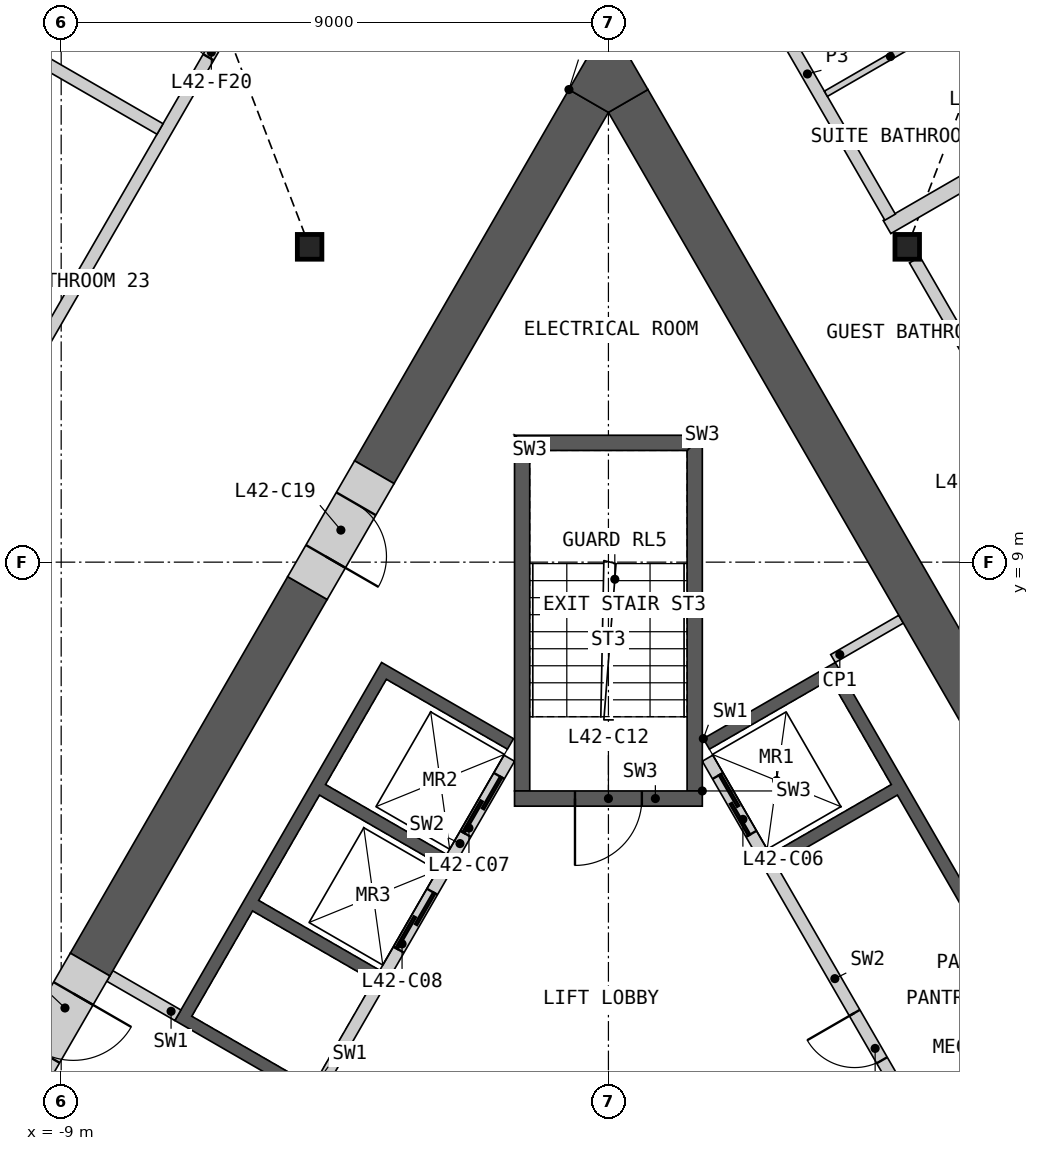
"""IFC4 building model, lengths in metres.
Left out: names, types, materials, properties, quantities, classifications, styles, units other than length and angle.
Written with IfcOpenShell. Run it as: python <this file> out.ifc"""

import sys

from ifc_helpers import new_model, si_unit, direction, frame, frame_2d, origin, origin_2d, place, context, subcontext, project, spatial, polyline, rectangle, i_section, outline, extrude, element, fill, save


model = new_model("IFC4")
c1 = context("Model", 3, precision=1e-05, world=origin(), true_north=direction((0.0, 1.0)))
c2 = subcontext(c1, "Body", "Model", "MODEL_VIEW")
j1 = project(units=[si_unit("LENGTHUNIT", "METRE"), si_unit("PLANEANGLEUNIT", "RADIAN")], contexts=[c1])
p1 = place(None, origin())
s1 = spatial("IfcSite", under=j1, at=p1, CompositionType="ELEMENT")
p2 = place(p1, origin())
s2 = spatial("IfcBuilding", under=s1, at=p2, CompositionType="ELEMENT")
p3 = place(p2, frame((0.0, 0.0, 194.4)))
s3 = spatial("IfcBuildingStorey", under=s2, at=p3, CompositionType="ELEMENT", Elevation=194.4)
for number, where, z_axis, x_axis in (
    (1, (-4.914, 14.186, 0.0), (0.0, 0.0, 1.0), (1.0, 0.0, 0.0)),
    (2, (4.914, 14.186, 0.0), (0.0, 0.0, 1.0), (1.0, 0.0, 0.0)),
):
    element("IfcColumn", number, at=place(p3, frame(where, z_axis=z_axis, x_axis=x_axis)), inside=s3, PredefinedType="COLUMN", context=c2, shape_type="SweptSolid", body=[
        extrude(i_section(OverallWidth=0.404, OverallDepth=0.407, WebThickness=0.027, FlangeThickness=0.044, at=origin_2d()), origin(), (0.0, 0.0, 1.0), 3.6),
    ])
p4 = place(p3, origin())
e3 = element("IfcWall", 3, at=p4, inside=s3, PredefinedType="SHEAR", context=c2, shape_type="SweptSolid", body=[
    extrude(outline(polyline([(1.561, 6.097), (3.731, 7.35), (8.231, -0.444), (6.061, -1.697), (5.96, -1.524), (7.952, -0.374), (4.752, 5.169), (2.76, 4.019), (2.66, 4.192), (4.652, 5.342), (3.652, 7.074), (1.66, 5.924), (1.561, 6.097)])), origin(), (0.0, 0.0, 1.0), 3.25),
])
p5 = place(p3, frame((5.817, -1.476, 0.0), z_axis=(0.0, 0.0, 1.0), x_axis=(-0.500002616675, 0.866023893041, 0.0)))
e4 = element("IfcWall", 4, at=p5, inside=s3, PredefinedType="SOLIDWALL", context=c2, shape_type="SweptSolid", body=[
    extrude(rectangle(XDim=8.373, YDim=0.2, at=frame_2d((4.187, 0.0))), origin(), (0.0, 0.0, 1.0), 3.25),
])
p6 = place(p5, frame((2.637, 0.0, 0.0)))
e5 = element("IfcOpeningElement", 5, at=p6, cuts=e4, PredefinedType="OPENING", context=c2, shape_type="SweptSolid", body=[
    extrude(rectangle(XDim=0.9, YDim=2.1, at=frame_2d((0.45, 1.05))), frame((0.0, 0.11, 0.0), z_axis=(0.0, -1.0, 0.0), x_axis=(1.0, 0.0, 0.0)), (0.0, 0.0, 1.0), 0.22),
])
p7 = place(p5, frame((6.937, 0.0, 0.0)))
e6 = element("IfcOpeningElement", 6, at=p7, cuts=e4, PredefinedType="OPENING", context=c2, shape_type="SweptSolid", body=[
    extrude(rectangle(XDim=1.1, YDim=2.1, at=frame_2d((0.55, 1.05))), frame((0.0, 0.11, 0.0), z_axis=(0.0, -1.0, 0.0), x_axis=(1.0, 0.0, 0.0)), (0.0, 0.0, 1.0), 0.22),
])
p8 = place(p3, origin())
e7 = element("IfcWall", 7, at=p8, inside=s3, PredefinedType="SHEAR", context=c2, shape_type="SweptSolid", body=[
    extrude(outline(polyline([(-4.96, 0.208), (-7.131, 1.461), (-3.731, 7.35), (-1.561, 6.097), (-1.66, 5.924), (-3.652, 7.074), (-4.652, 5.342), (-2.66, 4.192), (-2.76, 4.019), (-4.752, 5.169), (-5.752, 3.437), (-3.76, 2.287), (-3.861, 2.113), (-5.852, 3.263), (-6.852, 1.531), (-4.861, 0.381), (-4.96, 0.208)])), origin(), (0.0, 0.0, 1.0), 3.25),
])
p9 = place(p3, frame((-1.631, 5.776, 0.0), z_axis=(0.0, 0.0, 1.0), x_axis=(-0.499992876559, -0.866029516466, 0.0)))
e8 = element("IfcWall", 8, at=p9, inside=s3, PredefinedType="SOLIDWALL", context=c2, shape_type="SweptSolid", body=[
    extrude(rectangle(XDim=6.486, YDim=0.2, at=frame_2d((3.243, 0.0))), origin(), (0.0, 0.0, 1.0), 3.25),
])
p10 = place(p9, frame((0.337, 0.0, 0.0)))
e9 = element("IfcOpeningElement", 9, at=p10, cuts=e8, PredefinedType="OPENING", context=c2, shape_type="SweptSolid", body=[
    extrude(rectangle(XDim=1.1, YDim=2.1, at=frame_2d((0.55, 1.05))), frame((0.0, 0.11, 0.0), z_axis=(0.0, -1.0, 0.0), x_axis=(1.0, 0.0, 0.0)), (0.0, 0.0, 1.0), 0.22),
])
p11 = place(p9, frame((2.537, 0.0, 0.0)))
e10 = element("IfcOpeningElement", 10, at=p11, cuts=e8, PredefinedType="OPENING", context=c2, shape_type="SweptSolid", body=[
    extrude(rectangle(XDim=1.1, YDim=2.1, at=frame_2d((0.55, 1.05))), frame((0.0, 0.11, 0.0), z_axis=(0.0, -1.0, 0.0), x_axis=(1.0, 0.0, 0.0)), (0.0, 0.0, 1.0), 0.22),
])
p12 = place(p3, frame((-7.081, 1.548, 0.0), z_axis=(0.0, 0.0, 1.0), x_axis=(-0.866003189247, 0.500038474733, 0.0)))
e11 = element("IfcWall", 11, at=p12, inside=s3, PredefinedType="SHEAR", context=c2, shape_type="SweptSolid", body=[
    extrude(rectangle(XDim=1.293, YDim=0.2, at=frame_2d((0.646, 0.0))), origin(), (0.0, 0.0, 1.0), 3.25),
])
p13 = place(p3, origin())
e12 = element("IfcWall", 12, at=p13, inside=s3, PredefinedType="SHEAR", context=c2, shape_type="SweptSolid", body=[
    extrude(outline(polyline([(1.544, 5.237), (1.544, 11.087), (1.294, 10.837), (1.294, 5.237), (1.544, 5.237)])), origin(), (0.0, 0.0, 1.0), 3.25),
])
p14 = place(p3, origin())
e13 = element("IfcWall", 13, at=p14, inside=s3, PredefinedType="SHEAR", context=c2, shape_type="SweptSolid", body=[
    extrude(outline(polyline([(1.544, 11.087), (-1.544, 11.087), (-1.294, 10.837), (1.294, 10.837), (1.544, 11.087)])), origin(), (0.0, 0.0, 1.0), 3.25),
])
p15 = place(p3, origin())
e14 = element("IfcWall", 14, at=p15, inside=s3, PredefinedType="SHEAR", context=c2, shape_type="SweptSolid", body=[
    extrude(outline(polyline([(-1.294, 10.837), (-1.544, 11.087), (-1.544, 5.237), (-1.294, 5.237), (-1.294, 10.837)])), origin(), (0.0, 0.0, 1.0), 3.25),
])
p16 = place(p3, frame((1.544, 5.112, 0.0), z_axis=(0.0, 0.0, 1.0), x_axis=(-1.0, 0.0, 0.0)))
e15 = element("IfcWall", 15, at=p16, inside=s3, PredefinedType="SHEAR", context=c2, shape_type="SweptSolid", body=[
    extrude(rectangle(XDim=3.088, YDim=0.25, at=frame_2d((1.544, 0.0))), origin(), (0.0, 0.0, 1.0), 3.25),
])
p17 = place(p16, frame((0.994, 0.0, 0.0)))
e16 = element("IfcOpeningElement", 16, at=p17, cuts=e15, PredefinedType="OPENING", context=c2, shape_type="SweptSolid", body=[
    extrude(rectangle(XDim=1.1, YDim=2.1, at=frame_2d((0.55, 1.05))), frame((0.0, 0.135, 0.0), z_axis=(0.0, -1.0, 0.0), x_axis=(1.0, 0.0, 0.0)), (0.0, 0.0, 1.0), 0.27),
])
p18 = place(p3, frame((3.693, 7.415, 0.0), z_axis=(0.0, 0.0, 1.0), x_axis=(0.866003189247, 0.500038474733, 0.0)))
e17 = element("IfcWall", 17, at=p18, inside=s3, PredefinedType="PARTITIONING", context=c2, shape_type="SweptSolid", body=[
    extrude(rectangle(XDim=1.293, YDim=0.15, at=frame_2d((0.646, 0.0))), origin(), (0.0, 0.0, 1.0), 3.25),
])
p19 = place(p3, frame((6.875, 5.24, 0.0), z_axis=(0.0, 0.0, 1.0), x_axis=(-0.499997217876, 0.866027010039, 0.0)))
e18 = element("IfcWall", 18, at=p19, inside=s3, PredefinedType="SHEAR", context=c2, shape_type="SweptSolid", body=[
    extrude(rectangle(XDim=13.101, YDim=0.75, at=frame_2d((6.551, 0.0))), origin(), (0.0, 0.0, 1.0), 3.25),
])
p20 = place(p3, frame((-4.95, 8.574, 0.0), z_axis=(0.0, 0.0, 1.0), x_axis=(-0.499987463267, -0.866032641749, 0.0)))
e19 = element("IfcWall", 19, at=p20, inside=s3, PredefinedType="SHEAR", context=c2, shape_type="SweptSolid", body=[
    extrude(rectangle(XDim=7.151, YDim=0.75, at=frame_2d((3.575, 0.0))), origin(), (0.0, 0.0, 1.0), 3.25),
])
p21 = place(p3, frame((-0.325, 16.585, 0.0), z_axis=(0.0, 0.0, 1.0), x_axis=(-0.500012199891, -0.86601836006, 0.0)))
e20 = element("IfcWall", 20, at=p21, inside=s3, PredefinedType="SHEAR", context=c2, shape_type="SweptSolid", body=[
    extrude(rectangle(XDim=7.051, YDim=0.75, at=frame_2d((3.525, 0.0))), origin(), (0.0, 0.0, 1.0), 3.25),
])
p22 = place(p3, origin())
e21 = element("IfcWall", 21, at=p22, inside=s3, PredefinedType="SHEAR", context=c2, shape_type="SweptSolid", body=[
    extrude(outline(polyline([(-0.649, 16.773), (0.0, 17.898), (0.649, 16.773), (0.0, 16.398), (-0.649, 16.773)])), origin(), (0.0, 0.0, 1.0), 3.25),
])
p23 = place(p3, frame((-3.85, 10.479, 0.0), z_axis=(0.0, 0.0, 1.0), x_axis=(-0.499946605688, -0.86605622881, 0.0)))
e22 = element("IfcWall", 22, at=p23, inside=s3, PredefinedType="SHEAR", context=c2, shape_type="SweptSolid", body=[
    extrude(rectangle(XDim=2.2, YDim=0.75, at=frame_2d((1.1, 0.0))), origin(), (0.0, 0.0, 1.0), 3.25),
])
p24 = place(p23, frame((0.6, 0.0, 0.0)))
e23 = element("IfcOpeningElement", 23, at=p24, cuts=e22, PredefinedType="OPENING", context=c2, shape_type="SweptSolid", body=[
    extrude(rectangle(XDim=1.0, YDim=2.1, at=frame_2d((0.5, 1.05))), frame((0.0, 0.385, 0.0), z_axis=(0.0, -1.0, 0.0), x_axis=(1.0, 0.0, 0.0)), (0.0, 0.0, 1.0), 0.77),
])
p25 = place(p3, frame((-8.525, 2.382, 0.0), z_axis=(0.0, 0.0, 1.0), x_axis=(-0.500077893725, -0.86598042715, 0.0)))
e24 = element("IfcWall", 24, at=p25, inside=s3, PredefinedType="SHEAR", context=c2, shape_type="SweptSolid", body=[
    extrude(rectangle(XDim=2.2, YDim=0.75, at=frame_2d((1.1, 0.0))), origin(), (0.0, 0.0, 1.0), 3.25),
])
p26 = place(p25, frame((0.55, 0.0, 0.0)))
e25 = element("IfcOpeningElement", 25, at=p26, cuts=e24, PredefinedType="OPENING", context=c2, shape_type="SweptSolid", body=[
    extrude(rectangle(XDim=1.1, YDim=2.1, at=frame_2d((0.55, 1.05))), frame((0.0, 0.385, 0.0), z_axis=(0.0, -1.0, 0.0), x_axis=(1.0, 0.0, 0.0)), (0.0, 0.0, 1.0), 0.77),
])
p27 = place(p3, frame((-19.476, -5.035, 0.0), z_axis=(0.0, 0.0, 1.0), x_axis=(0.500000757641, 0.86602496636, 0.0)))
e26 = element("IfcWall", 26, at=p27, inside=s3, PredefinedType="PARTITIONING", context=c2, shape_type="SweptSolid", body=[
    extrude(rectangle(XDim=28.198, YDim=0.2, at=frame_2d((14.099, 0.0))), origin(), (0.0, 0.0, 1.0), 3.25),
])
p28 = place(p27, frame((25.796, 0.0, 0.0)))
e27 = element("IfcOpeningElement", 27, at=p28, cuts=e26, PredefinedType="OPENING", context=c2, shape_type="SweptSolid", body=[
    extrude(rectangle(XDim=0.95, YDim=2.1, at=frame_2d((0.475, 1.05))), frame((0.0, 0.11, 0.0), z_axis=(0.0, -1.0, 0.0), x_axis=(1.0, 0.0, 0.0)), (0.0, 0.0, 1.0), 0.22),
])
p29 = place(p27, frame((14.603, 0.0, 0.0)))
e28 = element("IfcOpeningElement", 28, at=p29, cuts=e26, PredefinedType="OPENING", context=c2, shape_type="SweptSolid", body=[
    extrude(rectangle(XDim=1.1, YDim=2.1, at=frame_2d((0.55, 1.05))), frame((0.0, 0.11, 0.0), z_axis=(0.0, -1.0, 0.0), x_axis=(1.0, 0.0, 0.0)), (0.0, 0.0, 1.0), 0.22),
])
p30 = place(p27, frame((11.993, 0.0, 0.0)))
e29 = element("IfcOpeningElement", 29, at=p30, cuts=e26, PredefinedType="OPENING", context=c2, shape_type="SweptSolid", body=[
    extrude(rectangle(XDim=1.1, YDim=2.1, at=frame_2d((0.55, 1.05))), frame((0.0, 0.11, 0.0), z_axis=(0.0, -1.0, 0.0), x_axis=(1.0, 0.0, 0.0)), (0.0, 0.0, 1.0), 0.22),
])
p31 = place(p27, frame((1.452, 0.0, 0.0)))
e30 = element("IfcOpeningElement", 30, at=p31, cuts=e26, PredefinedType="OPENING", context=c2, shape_type="SweptSolid", body=[
    extrude(rectangle(XDim=0.95, YDim=2.1, at=frame_2d((0.475, 1.05))), frame((0.0, 0.11, 0.0), z_axis=(0.0, -1.0, 0.0), x_axis=(1.0, 0.0, 0.0)), (0.0, 0.0, 1.0), 0.22),
])
p32 = place(p3, frame((4.582, 14.512, 0.0), z_axis=(0.0, 0.0, 1.0), x_axis=(0.866027263711, 0.4999967785, 0.0)))
e31 = element("IfcWall", 31, at=p32, inside=s3, PredefinedType="PARTITIONING", context=c2, shape_type="SweptSolid", body=[
    extrude(rectangle(XDim=12.994, YDim=0.25, at=frame_2d((6.497, 0.0))), origin(), (0.0, 0.0, 1.0), 2.404),
])
p33 = place(p3, frame((5.038, 13.972, 0.0), z_axis=(0.0, 0.0, 1.0), x_axis=(0.50000393355, -0.866023132736, 0.0)))
e32 = element("IfcWall", 32, at=p33, inside=s3, PredefinedType="PARTITIONING", context=c2, shape_type="SweptSolid", body=[
    extrude(rectangle(XDim=9.335, YDim=0.2, at=frame_2d((4.667, 0.0))), origin(), (0.0, 0.0, 1.0), 3.25),
])
p34 = place(p33, frame((5.979, 0.0, 0.0)))
e33 = element("IfcOpeningElement", 33, at=p34, cuts=e32, PredefinedType="OPENING", context=c2, shape_type="SweptSolid", body=[
    extrude(rectangle(XDim=1.8, YDim=2.1, at=frame_2d((0.9, 1.05))), frame((0.0, 0.11, 0.0), z_axis=(0.0, -1.0, 0.0), x_axis=(1.0, 0.0, 0.0)), (0.0, 0.0, 1.0), 0.22),
])
p35 = place(p33, frame((3.163, 0.0, 0.0)))
e34 = element("IfcOpeningElement", 34, at=p35, cuts=e32, PredefinedType="OPENING", context=c2, shape_type="SweptSolid", body=[
    extrude(rectangle(XDim=1.0, YDim=2.1, at=frame_2d((0.5, 1.05))), frame((0.0, 0.11, 0.0), z_axis=(0.0, -1.0, 0.0), x_axis=(1.0, 0.0, 0.0)), (0.0, 0.0, 1.0), 0.22),
])
p36 = place(p3, frame((1.913, 19.385, 0.0), z_axis=(0.0, 0.0, 1.0), x_axis=(0.499972435384, -0.866041317638, 0.0)))
e35 = element("IfcWall", 35, at=p36, inside=s3, PredefinedType="PARTITIONING", context=c2, shape_type="SweptSolid", body=[
    extrude(rectangle(XDim=5.439, YDim=0.2, at=frame_2d((2.719, 0.0))), origin(), (0.0, 0.0, 1.0), 3.25),
])
p37 = place(p36, frame((0.351, 0.0, 0.0)))
e36 = element("IfcOpeningElement", 36, at=p37, cuts=e35, PredefinedType="OPENING", context=c2, shape_type="SweptSolid", body=[
    extrude(rectangle(XDim=1.1, YDim=2.1, at=frame_2d((0.55, 1.05))), frame((0.0, 0.11, 0.0), z_axis=(0.0, -1.0, 0.0), x_axis=(1.0, 0.0, 0.0)), (0.0, 0.0, 1.0), 0.22),
])
p38 = place(p3, frame((-15.835, 21.009, 0.0), z_axis=(0.0, 0.0, 1.0), x_axis=(0.866024525919, -0.500001520505, 0.0)))
e37 = element("IfcWall", 37, at=p38, inside=s3, PredefinedType="PARTITIONING", context=c2, shape_type="SweptSolid", body=[
    extrude(rectangle(XDim=9.769, YDim=0.2, at=frame_2d((4.885, 0.0))), origin(), (0.0, 0.0, 1.0), 2.404),
])
p39 = place(p3, frame((5.717, 17.996, 0.0), z_axis=(0.0, 0.0, 1.0), x_axis=(0.500027264788, -0.866009661879, 0.0)))
e38 = element("IfcWall", 38, at=p39, inside=s3, PredefinedType="PARTITIONING", context=c2, shape_type="SweptSolid", body=[
    extrude(rectangle(XDim=5.2, YDim=0.1, at=frame_2d((2.6, 0.0))), origin(), (0.0, 0.0, 1.0), 2.404),
])
p40 = place(p39, frame((4.0, 0.0, 0.0)))
e39 = element("IfcOpeningElement", 39, at=p40, cuts=e38, PredefinedType="OPENING", context=c2, shape_type="SweptSolid", body=[
    extrude(rectangle(XDim=0.95, YDim=2.1, at=frame_2d((0.475, 1.05))), frame((0.0, 0.06, 0.0), z_axis=(0.0, -1.0, 0.0), x_axis=(1.0, 0.0, 0.0)), (0.0, 0.0, 1.0), 0.12),
])
p41 = place(p39, frame((0.25, 0.0, 0.0)))
e40 = element("IfcOpeningElement", 40, at=p41, cuts=e38, PredefinedType="OPENING", context=c2, shape_type="SweptSolid", body=[
    extrude(rectangle(XDim=0.95, YDim=2.1, at=frame_2d((0.475, 1.05))), frame((0.0, 0.06, 0.0), z_axis=(0.0, -1.0, 0.0), x_axis=(1.0, 0.0, 0.0)), (0.0, 0.0, 1.0), 0.12),
])
p42 = place(p3, frame((3.576, 16.703, 0.0), z_axis=(0.0, 0.0, 1.0), x_axis=(0.866057815567, 0.499943856944, 0.0)))
e41 = element("IfcWall", 41, at=p42, inside=s3, PredefinedType="PARTITIONING", context=c2, shape_type="SweptSolid", body=[
    extrude(rectangle(XDim=2.45, YDim=0.1, at=frame_2d((1.225, 0.0))), origin(), (0.0, 0.0, 1.0), 2.404),
])
p43 = place(p3, frame((-10.996, 14.752, 0.0), z_axis=(0.0, 0.0, 1.0), x_axis=(0.866014668023, -0.500018594424, 0.0)))
e42 = element("IfcWall", 42, at=p43, inside=s3, PredefinedType="PARTITIONING", context=c2, shape_type="SweptSolid", body=[
    extrude(rectangle(XDim=2.45, YDim=0.1, at=frame_2d((1.225, 0.0))), origin(), (0.0, 0.0, 1.0), 2.404),
])
p44 = place(p6, origin())
e43 = element("IfcDoor", 43, at=p44, inside=s3, OperationType="SINGLE_SWING_RIGHT", PredefinedType="DOOR", context=c2, shape_type="SweptSolid", body=[
    extrude(rectangle(XDim=0.9, YDim=2.1, at=frame_2d((0.45, 1.05))), frame((0.0, 0.025, 0.0), z_axis=(0.0, -1.0, 0.0), x_axis=(1.0, 0.0, 0.0)), (0.0, 0.0, 1.0), 0.05),
])
fill(e5, e43)
p45 = place(p7, origin())
e44 = element("IfcDoor", 44, at=p45, inside=s3, OperationType="SLIDING_TO_LEFT", PredefinedType="DOOR", context=c2, shape_type="SweptSolid", body=[
    extrude(rectangle(XDim=1.1, YDim=2.1, at=frame_2d((0.55, 1.05))), frame((0.0, 0.025, 0.0), z_axis=(0.0, -1.0, 0.0), x_axis=(1.0, 0.0, 0.0)), (0.0, 0.0, 1.0), 0.05),
])
fill(e6, e44)
p46 = place(p10, origin())
e45 = element("IfcDoor", 45, at=p46, inside=s3, OperationType="SLIDING_TO_LEFT", PredefinedType="DOOR", context=c2, shape_type="SweptSolid", body=[
    extrude(rectangle(XDim=1.1, YDim=2.1, at=frame_2d((0.55, 1.05))), frame((0.0, 0.025, 0.0), z_axis=(0.0, -1.0, 0.0), x_axis=(1.0, 0.0, 0.0)), (0.0, 0.0, 1.0), 0.05),
])
fill(e9, e45)
p47 = place(p11, origin())
e46 = element("IfcDoor", 46, at=p47, inside=s3, OperationType="SLIDING_TO_LEFT", PredefinedType="DOOR", context=c2, shape_type="SweptSolid", body=[
    extrude(rectangle(XDim=1.1, YDim=2.1, at=frame_2d((0.55, 1.05))), frame((0.0, 0.025, 0.0), z_axis=(0.0, -1.0, 0.0), x_axis=(1.0, 0.0, 0.0)), (0.0, 0.0, 1.0), 0.05),
])
fill(e10, e46)
p48 = place(p17, origin())
e47 = element("IfcDoor", 47, at=p48, inside=s3, OperationType="SINGLE_SWING_RIGHT", PredefinedType="DOOR", context=c2, shape_type="SweptSolid", body=[
    extrude(rectangle(XDim=1.1, YDim=2.1, at=frame_2d((0.55, 1.05))), frame((0.0, 0.025, 0.0), z_axis=(0.0, -1.0, 0.0), x_axis=(1.0, 0.0, 0.0)), (0.0, 0.0, 1.0), 0.05),
])
fill(e16, e47)
p49 = place(p24, origin())
e48 = element("IfcDoor", 48, at=p49, inside=s3, OperationType="SINGLE_SWING_RIGHT", PredefinedType="DOOR", context=c2, shape_type="SweptSolid", body=[
    extrude(rectangle(XDim=1.0, YDim=2.1, at=frame_2d((0.5, 1.05))), frame((0.0, 0.13, 0.0), z_axis=(0.0, -1.0, 0.0), x_axis=(1.0, 0.0, 0.0)), (0.0, 0.0, 1.0), 0.05),
])
fill(e23, e48)
p50 = place(p26, origin())
e49 = element("IfcDoor", 49, at=p50, inside=s3, OperationType="SINGLE_SWING_LEFT", PredefinedType="DOOR", context=c2, shape_type="SweptSolid", body=[
    extrude(rectangle(XDim=1.1, YDim=2.1, at=frame_2d((0.55, 1.05))), frame((0.0, 0.13, 0.0), z_axis=(0.0, -1.0, 0.0), x_axis=(1.0, 0.0, 0.0)), (0.0, 0.0, 1.0), 0.05),
])
fill(e25, e49)
p51 = place(p28, origin())
e50 = element("IfcDoor", 50, at=p51, inside=s3, OperationType="SINGLE_SWING_RIGHT", PredefinedType="DOOR", context=c2, shape_type="SweptSolid", body=[
    extrude(rectangle(XDim=0.95, YDim=2.1, at=frame_2d((0.475, 1.05))), frame((0.0, 0.025, 0.0), z_axis=(0.0, -1.0, 0.0), x_axis=(1.0, 0.0, 0.0)), (0.0, 0.0, 1.0), 0.05),
])
fill(e27, e50)
save(model, sys.argv[1])
